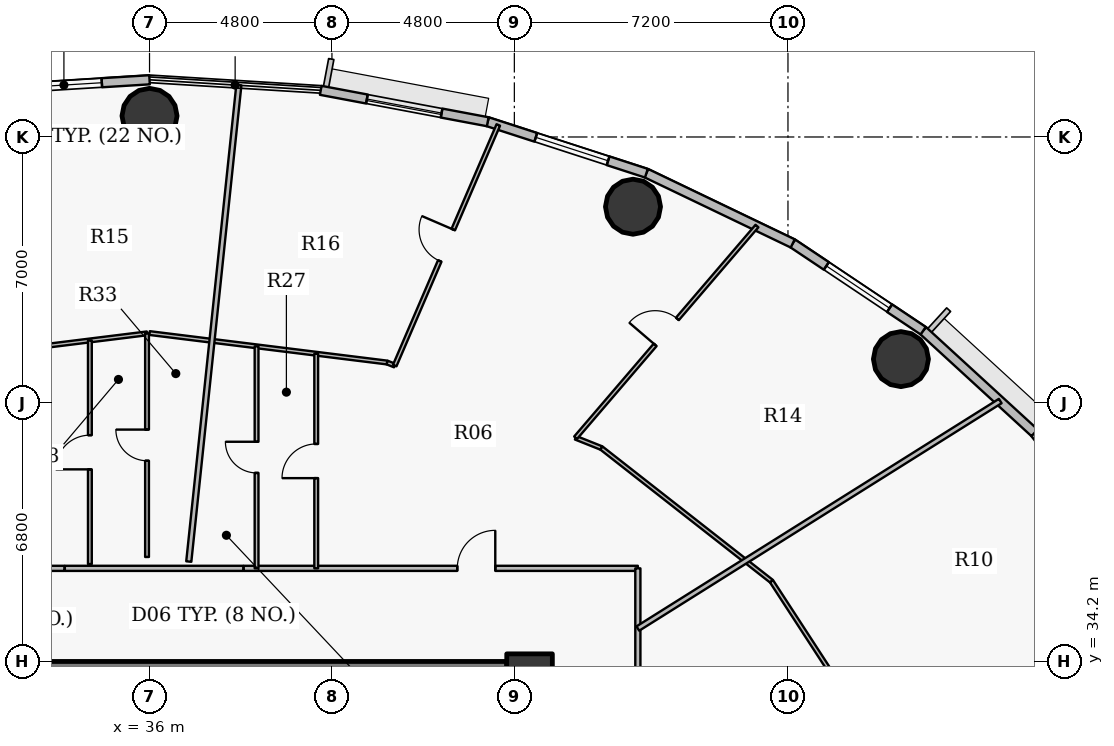
"""IFC4 building model, lengths in metres.
Left out: names, types, materials, properties, quantities, classifications, styles, units other than length and angle.
Written with IfcOpenShell. Run it as: python <this file> out.ifc"""

import sys

from ifc_helpers import new_model, si_unit, direction, frame, frame_2d, origin, origin_2d, place, context, subcontext, project, spatial, rectangle, hollow_circle, extrude, source, transform, mapped, element, fill, save


model = new_model("IFC4")
c1 = context("Model", 3, precision=1e-05, world=origin(), true_north=direction((0.0, 1.0)))
c2 = subcontext(c1, "Body", "Model", "MODEL_VIEW")
j1 = project(units=[si_unit("LENGTHUNIT", "METRE"), si_unit("PLANEANGLEUNIT", "RADIAN")], contexts=[c1])
p1 = place(None, origin())
s1 = spatial("IfcSite", under=j1, at=p1, CompositionType="ELEMENT")
p2 = place(p1, origin())
s2 = spatial("IfcBuilding", under=s1, at=p2, CompositionType="ELEMENT")
p3 = place(p2, frame((0.0, 0.0, 119.7)))
s3 = spatial("IfcBuildingStorey", under=s2, at=p3, CompositionType="ELEMENT", Elevation=119.7)
p4 = place(p3, frame((46.0, 33.8, 0.0), z_axis=(0.0, 0.0, 1.0), x_axis=(1.0, 0.0, 0.0)))
e1 = element("IfcColumn", 1, at=p4, inside=s3, PredefinedType="COLUMN", context=c2, shape_type="SweptSolid", body=[
    extrude(rectangle(XDim=1.2, YDim=1.2, at=origin_2d()), origin(), (0.0, 0.0, 1.0), 3.75),
])
p5 = place(p3, frame((26.6, 33.8, 0.0), z_axis=(0.0, 0.0, 1.0), x_axis=(1.0, 0.0, 0.0)))
e2 = element("IfcWall", 2, at=p5, inside=s3, PredefinedType="SHEAR", context=c2, shape_type="SweptSolid", body=[
    extrude(rectangle(XDim=18.8, YDim=0.8, at=frame_2d((9.4, 0.0))), origin(), (0.0, 0.0, 1.0), 2.95),
])
for number, where, z_axis, x_axis in (
    (3, (55.773, 42.156, 0.0), (0.0, 0.0, 1.0), (1.0, 0.0, 0.0)),
    (4, (48.722, 46.165, 0.0), (0.0, 0.0, 1.0), (1.0, 0.0, 0.0)),
    (5, (36.0, 48.555, 0.0), (0.0, 0.0, 1.0), (1.0, 0.0, 0.0)),
):
    element("IfcColumn", number, at=place(p3, frame(where, z_axis=z_axis, x_axis=x_axis)), inside=s3, PredefinedType="COLUMN", context=c2, shape_type="SweptSolid", body=[
        extrude(hollow_circle(Radius=0.725, WallThickness=0.042, at=origin_2d()), origin(), (0.0, 0.0, 1.0), 3.75),
    ])
p6 = place(p3, frame((59.289, 40.217, 0.0), z_axis=(0.0, 0.0, 1.0), x_axis=(0.616272103517, -0.787533297345, 0.0)))
e6 = element("IfcWall", 6, at=p6, inside=s3, PredefinedType="SOLIDWALL", context=c2, shape_type="SweptSolid", body=[
    extrude(rectangle(XDim=3.823, YDim=0.24, at=frame_2d((1.912, 0.0))), origin(), (0.0, 0.0, 1.0), 3.5),
])
p7 = place(p6, frame((0.912, 0.0, 0.9)))
e7 = element("IfcOpeningElement", 7, at=p7, cuts=e6, PredefinedType="OPENING", context=c2, shape_type="SweptSolid", body=[
    extrude(rectangle(XDim=2.0, YDim=1.75, at=origin_2d()), frame((1.0, 0.13, 0.875), z_axis=(0.0, -1.0, 0.0), x_axis=(1.0, 0.0, 0.0)), (0.0, 0.0, 1.0), 0.26),
])
p8 = place(p3, frame((56.358, 42.903, 0.0), z_axis=(0.0, 0.0, 1.0), x_axis=(0.737113356241, -0.675769117414, 0.0)))
e8 = element("IfcWall", 8, at=p8, inside=s3, PredefinedType="SOLIDWALL", context=c2, shape_type="SweptSolid", body=[
    extrude(rectangle(XDim=3.976, YDim=0.24, at=frame_2d((1.988, 0.0))), origin(), (0.0, 0.0, 1.0), 3.5),
])
p9 = place(p3, frame((52.925, 45.199, 0.0), z_axis=(0.0, 0.0, 1.0), x_axis=(0.831221811447, -0.555940914284, 0.0)))
e9 = element("IfcWall", 9, at=p9, inside=s3, PredefinedType="SOLIDWALL", context=c2, shape_type="SweptSolid", body=[
    extrude(rectangle(XDim=4.13, YDim=0.24, at=frame_2d((2.065, 0.0))), origin(), (0.0, 0.0, 1.0), 3.5),
])
p10 = place(p9, frame((1.065, 0.0, 0.9)))
e10 = element("IfcOpeningElement", 10, at=p10, cuts=e9, PredefinedType="OPENING", context=c2, shape_type="SweptSolid", body=[
    extrude(rectangle(XDim=2.0, YDim=1.75, at=origin_2d()), frame((1.0, 0.13, 0.875), z_axis=(0.0, -1.0, 0.0), x_axis=(1.0, 0.0, 0.0)), (0.0, 0.0, 1.0), 0.26),
])
p11 = place(p3, frame((49.074, 47.047, 0.0), z_axis=(0.0, 0.0, 1.0), x_axis=(0.901589935876, -0.432591709962, 0.0)))
e11 = element("IfcWall", 11, at=p11, inside=s3, PredefinedType="SOLIDWALL", context=c2, shape_type="SweptSolid", body=[
    extrude(rectangle(XDim=4.272, YDim=0.24, at=frame_2d((2.136, 0.0))), origin(), (0.0, 0.0, 1.0), 3.5),
])
p12 = place(p3, frame((44.9, 48.401, 0.0), z_axis=(0.0, 0.0, 1.0), x_axis=(0.951211346073, -0.308540070495, 0.0)))
e12 = element("IfcWall", 12, at=p12, inside=s3, PredefinedType="SOLIDWALL", context=c2, shape_type="SweptSolid", body=[
    extrude(rectangle(XDim=4.388, YDim=0.24, at=frame_2d((2.194, 0.0))), origin(), (0.0, 0.0, 1.0), 3.5),
])
p13 = place(p12, frame((1.329, 0.0, 0.9)))
e13 = element("IfcOpeningElement", 13, at=p13, cuts=e12, PredefinedType="OPENING", context=c2, shape_type="SweptSolid", body=[
    extrude(rectangle(XDim=2.0, YDim=1.75, at=origin_2d()), frame((1.0, 0.13, 0.875), z_axis=(0.0, -1.0, 0.0), x_axis=(1.0, 0.0, 0.0)), (0.0, 0.0, 1.0), 0.26),
])
p14 = place(p3, frame((40.506, 49.227, 0.0), z_axis=(0.0, 0.0, 1.0), x_axis=(0.982789252177, -0.184730305596, 0.0)))
e14 = element("IfcWall", 14, at=p14, inside=s3, PredefinedType="SOLIDWALL", context=c2, shape_type="SweptSolid", body=[
    extrude(rectangle(XDim=4.471, YDim=0.24, at=frame_2d((2.235, 0.0))), origin(), (0.0, 0.0, 1.0), 3.5),
])
p15 = place(p14, frame((1.236, 0.0, 0.9)))
e15 = element("IfcOpeningElement", 15, at=p15, cuts=e14, PredefinedType="OPENING", context=c2, shape_type="SweptSolid", body=[
    extrude(rectangle(XDim=2.0, YDim=1.75, at=origin_2d()), frame((1.0, 0.13, 0.875), z_axis=(0.0, -1.0, 0.0), x_axis=(1.0, 0.0, 0.0)), (0.0, 0.0, 1.0), 0.26),
])
p16 = place(p3, frame((31.494, 49.227, 0.0), z_axis=(0.0, 0.0, 1.0), x_axis=(0.998107531589, 0.061492726276, 0.0)))
e16 = element("IfcWall", 16, at=p16, inside=s3, PredefinedType="SOLIDWALL", context=c2, shape_type="SweptSolid", body=[
    extrude(rectangle(XDim=4.514, YDim=0.24, at=frame_2d((2.257, 0.0))), origin(), (0.0, 0.0, 1.0), 3.5),
])
p17 = place(p16, frame((1.257, 0.0, 0.9)))
e17 = element("IfcOpeningElement", 17, at=p17, cuts=e16, PredefinedType="OPENING", context=c2, shape_type="SweptSolid", body=[
    extrude(rectangle(XDim=2.0, YDim=1.75, at=origin_2d()), frame((1.0, 0.13, 0.875), z_axis=(0.0, -1.0, 0.0), x_axis=(1.0, 0.0, 0.0)), (0.0, 0.0, 1.0), 0.26),
])
p18 = place(p3, frame((23.15, 36.65, 0.0), z_axis=(0.0, 0.0, 1.0), x_axis=(1.0, 0.0, 0.0)))
e18 = element("IfcWall", 18, at=p18, inside=s3, PredefinedType="PARTITIONING", context=c2, shape_type="SweptSolid", body=[
    extrude(rectangle(XDim=10.612, YDim=0.135, at=frame_2d((5.306, 0.0))), origin(), (0.0, 0.0, 1.0), 2.935),
])
p19 = place(p18, frame((8.182, 0.0, 0.0)))
e19 = element("IfcOpeningElement", 19, at=p19, cuts=e18, PredefinedType="OPENING", context=c2, shape_type="SweptSolid", body=[
    extrude(rectangle(XDim=1.0, YDim=2.15, at=origin_2d()), frame((0.5, 0.078, 1.075), z_axis=(0.0, -1.0, 0.0), x_axis=(1.0, 0.0, 0.0)), (0.0, 0.0, 1.0), 0.155),
])
p20 = place(p3, frame((32.428, 42.398, 0.0), z_axis=(0.0, 0.0, 1.0), x_axis=(0.992389102891, 0.123141660146, 0.0)))
e20 = element("IfcWall", 20, at=p20, inside=s3, PredefinedType="PARTITIONING", context=c2, shape_type="SweptSolid", body=[
    extrude(rectangle(XDim=3.533, YDim=0.1, at=frame_2d((1.767, 0.0))), origin(), (0.0, 0.0, 1.0), 2.935),
])
p21 = place(p3, frame((34.43, 36.762, 0.0), z_axis=(0.0, 0.0, 1.0), x_axis=(0.0, 1.0, 0.0)))
e21 = element("IfcWall", 21, at=p21, inside=s3, PredefinedType="PARTITIONING", context=c2, shape_type="SweptSolid", body=[
    extrude(rectangle(XDim=5.884, YDim=0.1, at=frame_2d((2.942, 0.0))), origin(), (0.0, 0.0, 1.0), 3.035),
])
p22 = place(p21, frame((2.492, 0.0, 0.0)))
e22 = element("IfcOpeningElement", 22, at=p22, cuts=e21, PredefinedType="OPENING", context=c2, shape_type="SweptSolid", body=[
    extrude(rectangle(XDim=0.9, YDim=2.1, at=origin_2d()), frame((0.45, 0.06, 1.05), z_axis=(0.0, -1.0, 0.0), x_axis=(1.0, 0.0, 0.0)), (0.0, 0.0, 1.0), 0.12),
])
p23 = place(p3, frame((35.935, 36.949, 0.0), z_axis=(0.0, 0.0, 1.0), x_axis=(0.0, 1.0, 0.0)))
e23 = element("IfcWall", 23, at=p23, inside=s3, PredefinedType="PARTITIONING", context=c2, shape_type="SweptSolid", body=[
    extrude(rectangle(XDim=5.884, YDim=0.1, at=frame_2d((2.942, 0.0))), origin(), (0.0, 0.0, 1.0), 2.935),
])
p24 = place(p23, frame((2.532, 0.0, 0.0)))
e24 = element("IfcOpeningElement", 24, at=p24, cuts=e23, PredefinedType="OPENING", context=c2, shape_type="SweptSolid", body=[
    extrude(rectangle(XDim=0.82, YDim=2.1, at=origin_2d()), frame((0.41, 0.06, 1.05), z_axis=(0.0, -1.0, 0.0), x_axis=(1.0, 0.0, 0.0)), (0.0, 0.0, 1.0), 0.12),
])
p25 = place(p3, frame((36.0, 42.841, 0.0), z_axis=(0.0, 0.0, 1.0), x_axis=(0.992395485088, -0.123090215599, 0.0)))
e25 = element("IfcWall", 25, at=p25, inside=s3, PredefinedType="PARTITIONING", context=c2, shape_type="SweptSolid", body=[
    extrude(rectangle(XDim=6.299, YDim=0.1, at=frame_2d((3.15, 0.0))), origin(), (0.0, 0.0, 1.0), 2.935),
])
p26 = place(p3, frame((37.033, 36.829, 0.0), z_axis=(0.0, 0.0, 1.0), x_axis=(0.104530526966, 0.994521678463, 0.0)))
e26 = element("IfcWall", 26, at=p26, inside=s3, PredefinedType="PARTITIONING", context=c2, shape_type="SweptSolid", body=[
    extrude(rectangle(XDim=12.605, YDim=0.135, at=frame_2d((6.303, 0.0))), origin(), (0.0, 0.0, 1.0), 2.935),
])
p27 = place(p3, frame((38.477, 36.65, 0.0), z_axis=(0.0, 0.0, 1.0), x_axis=(1.0, 0.0, 0.0)))
e27 = element("IfcWall", 27, at=p27, inside=s3, PredefinedType="PARTITIONING", context=c2, shape_type="SweptSolid", body=[
    extrude(rectangle(XDim=10.373, YDim=0.135, at=frame_2d((5.187, 0.0))), origin(), (0.0, 0.0, 1.0), 2.935),
])
p28 = place(p27, frame((5.621, 0.0, 0.0)))
e28 = element("IfcOpeningElement", 28, at=p28, cuts=e27, PredefinedType="OPENING", context=c2, shape_type="SweptSolid", body=[
    extrude(rectangle(XDim=1.0, YDim=2.15, at=origin_2d()), frame((0.5, 0.078, 1.075), z_axis=(0.0, -1.0, 0.0), x_axis=(1.0, 0.0, 0.0)), (0.0, 0.0, 1.0), 0.155),
])
p29 = place(p3, frame((38.817, 36.65, 0.0), z_axis=(0.0, 0.0, 1.0), x_axis=(0.0, 1.0, 0.0)))
e29 = element("IfcWall", 29, at=p29, inside=s3, PredefinedType="PARTITIONING", context=c2, shape_type="SweptSolid", body=[
    extrude(rectangle(XDim=5.842, YDim=0.1, at=frame_2d((2.921, 0.0))), origin(), (0.0, 0.0, 1.0), 3.5),
])
p30 = place(p29, frame((2.511, 0.0, 0.0)))
e30 = element("IfcOpeningElement", 30, at=p30, cuts=e29, PredefinedType="OPENING", context=c2, shape_type="SweptSolid", body=[
    extrude(rectangle(XDim=0.82, YDim=2.1, at=origin_2d()), frame((0.41, 0.06, 1.05), z_axis=(0.0, -1.0, 0.0), x_axis=(1.0, 0.0, 0.0)), (0.0, 0.0, 1.0), 0.12),
])
p31 = place(p3, frame((40.386, 36.65, 0.0), z_axis=(0.0, 0.0, 1.0), x_axis=(0.0, 1.0, 0.0)))
e31 = element("IfcWall", 31, at=p31, inside=s3, PredefinedType="PARTITIONING", context=c2, shape_type="SweptSolid", body=[
    extrude(rectangle(XDim=5.647, YDim=0.1, at=frame_2d((2.824, 0.0))), origin(), (0.0, 0.0, 1.0), 3.5),
])
p32 = place(p31, frame((2.374, 0.0, 0.0)))
e32 = element("IfcOpeningElement", 32, at=p32, cuts=e31, PredefinedType="OPENING", context=c2, shape_type="SweptSolid", body=[
    extrude(rectangle(XDim=0.9, YDim=2.1, at=origin_2d()), frame((0.45, 0.06, 1.05), z_axis=(0.0, -1.0, 0.0), x_axis=(1.0, 0.0, 0.0)), (0.0, 0.0, 1.0), 0.12),
])
p33 = place(p3, frame((42.251, 42.066, 0.0), z_axis=(0.0, 0.0, 1.0), x_axis=(0.928632622675, -0.371000609303, 0.0)))
e33 = element("IfcWall", 33, at=p33, inside=s3, PredefinedType="PARTITIONING", context=c2, shape_type="SweptSolid", body=[
    extrude(rectangle(XDim=0.216, YDim=0.1, at=frame_2d((0.108, 0.0))), origin(), (0.0, 0.0, 1.0), 3.5),
])
p34 = place(p3, frame((42.452, 41.986, 0.0), z_axis=(0.0, 0.0, 1.0), x_axis=(0.395466235438, 0.918480515105, 0.0)))
e34 = element("IfcWall", 34, at=p34, inside=s3, PredefinedType="PARTITIONING", context=c2, shape_type="SweptSolid", body=[
    extrude(rectangle(XDim=6.893, YDim=0.1, at=frame_2d((3.446, 0.0))), origin(), (0.0, 0.0, 1.0), 2.935),
])
p35 = place(p34, frame((2.996, 0.0, 0.0)))
e35 = element("IfcOpeningElement", 35, at=p35, cuts=e34, PredefinedType="OPENING", context=c2, shape_type="SweptSolid", body=[
    extrude(rectangle(XDim=0.9, YDim=2.1, at=origin_2d()), frame((0.45, 0.06, 1.05), z_axis=(0.0, -1.0, 0.0), x_axis=(1.0, 0.0, 0.0)), (0.0, 0.0, 1.0), 0.12),
])
p36 = place(p3, frame((47.212, 40.087, 0.0), z_axis=(0.0, 0.0, 1.0), x_axis=(0.928752817467, -0.370699614307, 0.0)))
e36 = element("IfcWall", 36, at=p36, inside=s3, PredefinedType="PARTITIONING", context=c2, shape_type="SweptSolid", body=[
    extrude(rectangle(XDim=0.731, YDim=0.1, at=frame_2d((0.365, 0.0))), origin(), (0.0, 0.0, 1.0), 3.035),
])
p37 = place(p3, frame((47.212, 40.087, 0.0), z_axis=(0.0, 0.0, 1.0), x_axis=(0.650621399292, 0.759402261508, 0.0)))
e37 = element("IfcWall", 37, at=p37, inside=s3, PredefinedType="PARTITIONING", context=c2, shape_type="SweptSolid", body=[
    extrude(rectangle(XDim=7.334, YDim=0.1, at=frame_2d((3.667, 0.0))), origin(), (0.0, 0.0, 1.0), 2.935),
])
p38 = place(p37, frame((3.217, 0.0, 0.0)))
e38 = element("IfcOpeningElement", 38, at=p38, cuts=e37, PredefinedType="OPENING", context=c2, shape_type="SweptSolid", body=[
    extrude(rectangle(XDim=0.9, YDim=2.1, at=origin_2d()), frame((0.45, 0.06, 1.05), z_axis=(0.0, -1.0, 0.0), x_axis=(1.0, 0.0, 0.0)), (0.0, 0.0, 1.0), 0.12),
])
p39 = place(p3, frame((47.891, 39.816, 0.0), z_axis=(0.0, 0.0, 1.0), x_axis=(0.787338202739, -0.616521333376, 0.0)))
e39 = element("IfcWall", 39, at=p39, inside=s3, PredefinedType="PARTITIONING", context=c2, shape_type="SweptSolid", body=[
    extrude(rectangle(XDim=5.684, YDim=0.1, at=frame_2d((2.842, 0.0))), origin(), (0.0, 0.0, 1.0), 2.935),
])
p40 = place(p3, frame((48.85, 17.35, 0.0), z_axis=(0.0, 0.0, 1.0), x_axis=(0.0, 1.0, 0.0)))
e40 = element("IfcWall", 40, at=p40, inside=s3, PredefinedType="PARTITIONING", context=c2, shape_type="SweptSolid", body=[
    extrude(rectangle(XDim=19.3, YDim=0.135, at=frame_2d((9.65, 0.0))), origin(), (0.0, 0.0, 1.0), 2.935),
])
p41 = place(p40, frame((2.036, 0.0, 0.0)))
e41 = element("IfcOpeningElement", 41, at=p41, cuts=e40, PredefinedType="OPENING", context=c2, shape_type="SweptSolid", body=[
    extrude(rectangle(XDim=1.0, YDim=2.15, at=origin_2d()), frame((0.5, 0.078, 1.075), z_axis=(0.0, -1.0, 0.0), x_axis=(1.0, 0.0, 0.0)), (0.0, 0.0, 1.0), 0.155),
])
p42 = place(p40, frame((10.875, 0.0, 0.0)))
e42 = element("IfcOpeningElement", 42, at=p42, cuts=e40, PredefinedType="OPENING", context=c2, shape_type="SweptSolid", body=[
    extrude(rectangle(XDim=1.0, YDim=2.15, at=origin_2d()), frame((0.5, 0.078, 1.075), z_axis=(0.0, -1.0, 0.0), x_axis=(1.0, 0.0, 0.0)), (0.0, 0.0, 1.0), 0.155),
])
p43 = place(p3, frame((48.85, 35.066, 0.0), z_axis=(0.0, 0.0, 1.0), x_axis=(0.846963568038, 0.531650932866, 0.0)))
e43 = element("IfcWall", 43, at=p43, inside=s3, PredefinedType="PARTITIONING", context=c2, shape_type="SweptSolid", body=[
    extrude(rectangle(XDim=11.258, YDim=0.135, at=frame_2d((5.629, 0.0))), origin(), (0.0, 0.0, 1.0), 2.935),
])
p44 = place(p3, frame((52.366, 36.311, 0.0), z_axis=(0.0, 0.0, 1.0), x_axis=(0.545394651961, -0.838179380331, 0.0)))
e44 = element("IfcWall", 44, at=p44, inside=s3, PredefinedType="PARTITIONING", context=c2, shape_type="SweptSolid", body=[
    extrude(rectangle(XDim=5.068, YDim=0.1, at=frame_2d((2.534, 0.0))), origin(), (0.0, 0.0, 1.0), 3.5),
])
p45 = place(p3, frame((55.131, 32.063, 0.0), z_axis=(0.0, 0.0, 1.0), x_axis=(0.96671793708, 0.255844542893, 0.0)))
e45 = element("IfcWall", 45, at=p45, inside=s3, PredefinedType="PARTITIONING", context=c2, shape_type="SweptSolid", body=[
    extrude(rectangle(XDim=8.385, YDim=0.1, at=frame_2d((4.192, 0.0))), origin(), (0.0, 0.0, 1.0), 2.935),
])
p46 = place(p45, frame((2.65, 0.0, 0.0)))
e46 = element("IfcOpeningElement", 46, at=p46, cuts=e45, PredefinedType="OPENING", context=c2, shape_type="SweptSolid", body=[
    extrude(rectangle(XDim=0.9, YDim=2.1, at=origin_2d()), frame((0.45, 0.06, 1.05), z_axis=(0.0, -1.0, 0.0), x_axis=(1.0, 0.0, 0.0)), (0.0, 0.0, 1.0), 0.12),
])
p47 = place(p3, frame((33.772, 36.65, 0.0), z_axis=(0.0, 0.0, 1.0), x_axis=(1.0, 0.0, 0.0)))
e47 = element("IfcWall", 47, at=p47, inside=s3, PredefinedType="PARTITIONING", context=c2, shape_type="SweptSolid", body=[
    extrude(rectangle(XDim=4.695, YDim=0.135, at=frame_2d((2.348, 0.0))), origin(), (0.0, 0.0, 1.0), 2.935),
])
p48 = place(p3, frame((46.4, 34.2, 0.0), z_axis=(0.0, 0.0, 1.0), x_axis=(-1.0, 0.0, 0.0)))
e48 = element("IfcWall", 48, at=p48, inside=s3, PredefinedType="PARTITIONING", context=c2, shape_type="SweptSolid", body=[
    extrude(rectangle(XDim=0.99, YDim=0.135, at=frame_2d((0.495, 0.0))), origin(), (0.0, 0.0, 1.0), 2.935),
])
m1 = source(origin(), c2, "Body", "SweptSolid", [
    extrude(rectangle(XDim=2.0, YDim=1.75, at=origin_2d()), frame((1.0, 0.03, 0.875), z_axis=(0.0, -1.0, 0.0), x_axis=(1.0, 0.0, 0.0)), (0.0, 0.0, 1.0), 0.06),
])
p49 = place(p10, origin())
e49 = element("IfcWindow", 49, at=p49, inside=s3, PartitioningType="DOUBLE_PANEL_VERTICAL", PredefinedType="WINDOW", context=c2, shape_type="MappedRepresentation", body=[
    mapped(m1, transform((0.0, 0.0, 0.0), x_axis=(1.0, 0.0, 0.0), y_axis=(0.0, 1.0, 0.0), z_axis=(0.0, 0.0, 1.0), scale=1.0)),
])
fill(e10, e49)
p50 = place(p13, origin())
e50 = element("IfcWindow", 50, at=p50, inside=s3, PartitioningType="DOUBLE_PANEL_VERTICAL", PredefinedType="WINDOW", context=c2, shape_type="MappedRepresentation", body=[
    mapped(m1, transform((0.0, 0.0, 0.0), x_axis=(1.0, 0.0, 0.0), y_axis=(0.0, 1.0, 0.0), z_axis=(0.0, 0.0, 1.0), scale=1.0)),
])
fill(e13, e50)
p51 = place(p15, origin())
e51 = element("IfcWindow", 51, at=p51, inside=s3, PartitioningType="DOUBLE_PANEL_VERTICAL", PredefinedType="WINDOW", context=c2, shape_type="MappedRepresentation", body=[
    mapped(m1, transform((0.0, 0.0, 0.0), x_axis=(1.0, 0.0, 0.0), y_axis=(0.0, 1.0, 0.0), z_axis=(0.0, 0.0, 1.0), scale=1.0)),
])
fill(e15, e51)
p52 = place(p17, origin())
e52 = element("IfcWindow", 52, at=p52, inside=s3, PartitioningType="DOUBLE_PANEL_VERTICAL", PredefinedType="WINDOW", context=c2, shape_type="MappedRepresentation", body=[
    mapped(m1, transform((0.0, 0.0, 0.0), x_axis=(1.0, 0.0, 0.0), y_axis=(0.0, 1.0, 0.0), z_axis=(0.0, 0.0, 1.0), scale=1.0)),
])
fill(e17, e52)
m2 = source(origin(), c2, "Body", "SweptSolid", [
    extrude(rectangle(XDim=0.9, YDim=2.1, at=origin_2d()), frame((0.45, 0.025, 1.05), z_axis=(0.0, -1.0, 0.0), x_axis=(1.0, 0.0, 0.0)), (0.0, 0.0, 1.0), 0.05),
])
p53 = place(p22, origin())
e53 = element("IfcDoor", 53, at=p53, inside=s3, OperationType="SINGLE_SWING_LEFT", PredefinedType="DOOR", context=c2, shape_type="MappedRepresentation", body=[
    mapped(m2, transform((0.0, 0.0, 0.0), x_axis=(1.0, 0.0, 0.0), y_axis=(0.0, 1.0, 0.0), z_axis=(0.0, 0.0, 1.0), scale=1.0)),
])
fill(e22, e53)
m3 = source(origin(), c2, "Body", "SweptSolid", [
    extrude(rectangle(XDim=0.82, YDim=2.1, at=origin_2d()), frame((0.41, 0.025, 1.05), z_axis=(0.0, -1.0, 0.0), x_axis=(1.0, 0.0, 0.0)), (0.0, 0.0, 1.0), 0.05),
])
p54 = place(p24, origin())
e54 = element("IfcDoor", 54, at=p54, inside=s3, OperationType="SINGLE_SWING_RIGHT", PredefinedType="DOOR", context=c2, shape_type="MappedRepresentation", body=[
    mapped(m3, transform((0.0, 0.0, 0.0), x_axis=(1.0, 0.0, 0.0), y_axis=(0.0, 1.0, 0.0), z_axis=(0.0, 0.0, 1.0), scale=1.0)),
])
fill(e24, e54)
m4 = source(origin(), c2, "Body", "SweptSolid", [
    extrude(rectangle(XDim=1.0, YDim=2.15, at=origin_2d()), frame((0.5, 0.025, 1.075), z_axis=(0.0, -1.0, 0.0), x_axis=(1.0, 0.0, 0.0)), (0.0, 0.0, 1.0), 0.05),
])
p55 = place(p28, origin())
e55 = element("IfcDoor", 55, at=p55, inside=s3, OperationType="SINGLE_SWING_RIGHT", PredefinedType="DOOR", context=c2, shape_type="MappedRepresentation", body=[
    mapped(m4, transform((0.0, 0.0, 0.0), x_axis=(1.0, 0.0, 0.0), y_axis=(0.0, 1.0, 0.0), z_axis=(0.0, 0.0, 1.0), scale=1.0)),
])
fill(e28, e55)
p56 = place(p38, origin())
e56 = element("IfcDoor", 56, at=p56, inside=s3, OperationType="SINGLE_SWING_LEFT", PredefinedType="DOOR", context=c2, shape_type="MappedRepresentation", body=[
    mapped(m2, transform((0.0, 0.0, 0.0), x_axis=(1.0, 0.0, 0.0), y_axis=(0.0, 1.0, 0.0), z_axis=(0.0, 0.0, 1.0), scale=1.0)),
])
fill(e38, e56)
p57 = place(p35, origin())
e57 = element("IfcDoor", 57, at=p57, inside=s3, OperationType="SINGLE_SWING_RIGHT", PredefinedType="DOOR", context=c2, shape_type="MappedRepresentation", body=[
    mapped(m2, transform((0.0, 0.0, 0.0), x_axis=(1.0, 0.0, 0.0), y_axis=(0.0, 1.0, 0.0), z_axis=(0.0, 0.0, 1.0), scale=1.0)),
])
fill(e35, e57)
p58 = place(p32, origin())
e58 = element("IfcDoor", 58, at=p58, inside=s3, OperationType="SINGLE_SWING_LEFT", PredefinedType="DOOR", context=c2, shape_type="MappedRepresentation", body=[
    mapped(m2, transform((0.0, 0.0, 0.0), x_axis=(1.0, 0.0, 0.0), y_axis=(0.0, 1.0, 0.0), z_axis=(0.0, 0.0, 1.0), scale=1.0)),
])
fill(e32, e58)
p59 = place(p30, origin())
e59 = element("IfcDoor", 59, at=p59, inside=s3, OperationType="SINGLE_SWING_RIGHT", PredefinedType="DOOR", context=c2, shape_type="MappedRepresentation", body=[
    mapped(m3, transform((0.0, 0.0, 0.0), x_axis=(1.0, 0.0, 0.0), y_axis=(0.0, 1.0, 0.0), z_axis=(0.0, 0.0, 1.0), scale=1.0)),
])
fill(e30, e59)
save(model, sys.argv[1])
